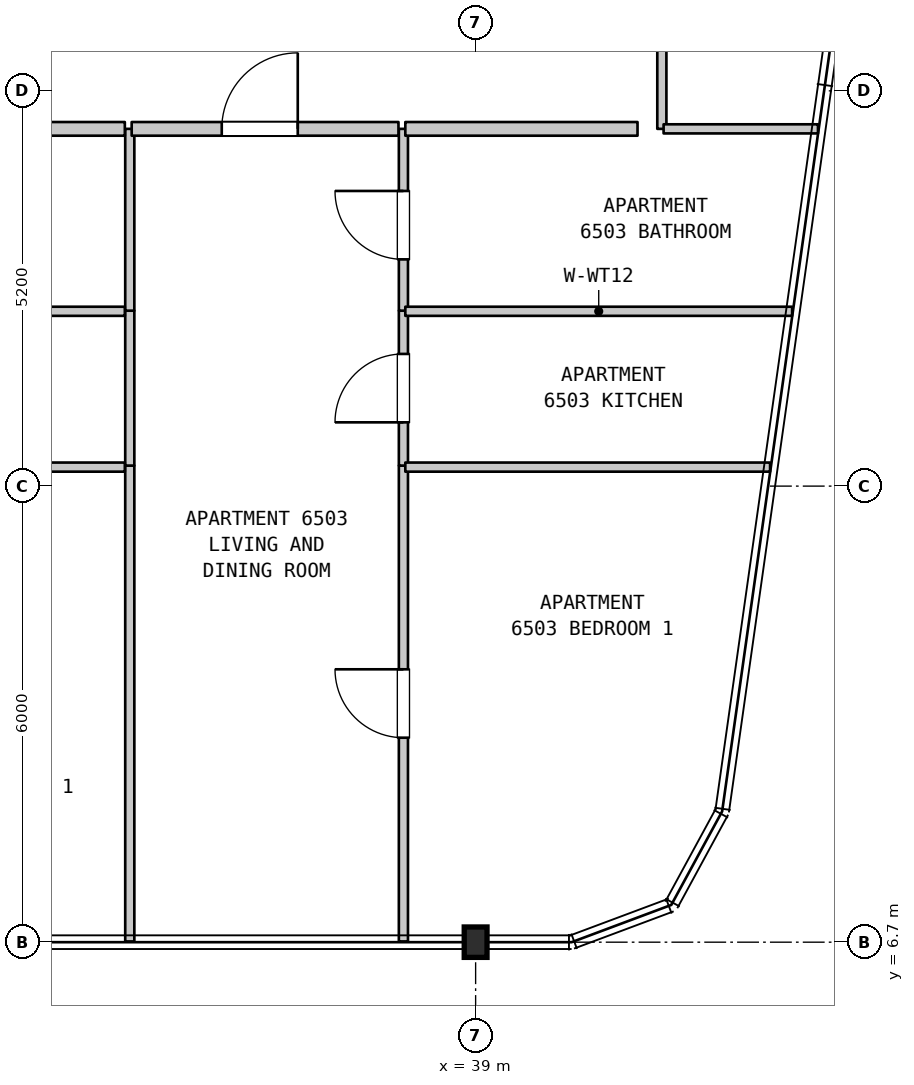
"""IFC4 building model, lengths in metres.
Left out: names, types, materials, properties, quantities, classifications, styles, units other than length and angle.
Written with IfcOpenShell. Run it as: python <this file> out.ifc"""

import sys

from ifc_helpers import new_model, si_unit, direction, frame, frame_2d, origin, origin_2d, place, context, subcontext, project, spatial, rectangle, i_section, extrude, element, fill, save


model = new_model("IFC4")
c1 = context("Model", 3, precision=1e-05, world=origin(), true_north=direction((0.0, 1.0)))
c2 = subcontext(c1, "Body", "Model", "MODEL_VIEW")
j1 = project(units=[si_unit("LENGTHUNIT", "METRE"), si_unit("PLANEANGLEUNIT", "RADIAN")], contexts=[c1])
p1 = place(None, origin())
s1 = spatial("IfcSite", under=j1, at=p1, CompositionType="ELEMENT")
p2 = place(p1, origin())
s2 = spatial("IfcBuilding", under=s1, at=p2, CompositionType="ELEMENT")
p3 = place(p2, frame((0.0, 0.0, 262.1)))
s3 = spatial("IfcBuildingStorey", under=s2, at=p3, CompositionType="ELEMENT", Elevation=262.1)
p4 = place(p3, frame((39.0, 6.7, 0.0), z_axis=(0.0, 0.0, 1.0), x_axis=(1.0, 0.0, 0.0)))
e1 = element("IfcColumn", 1, at=p4, inside=s3, PredefinedType="COLUMN", context=c2, shape_type="SweptSolid", body=[
    extrude(i_section(OverallWidth=0.3, OverallDepth=0.4, WebThickness=0.013, FlangeThickness=0.024, FilletRadius=0.027, at=origin_2d()), origin(), (0.0, 0.0, 1.0), 3.7),
])
p5 = place(p3, frame((34.45, 6.71, 0.0), z_axis=(0.0, 0.0, 1.0), x_axis=(0.0, 1.0, 0.0)))
e2 = element("IfcWall", 2, at=p5, inside=s3, PredefinedType="PARTITIONING", context=c2, shape_type="SweptSolid", body=[
    extrude(rectangle(XDim=6.26, YDim=0.12, at=frame_2d((3.13, 0.0))), origin(), (0.0, 0.0, 1.0), 3.39),
])
p6 = place(p3, frame((34.45, 12.97, 0.0), z_axis=(0.0, 0.0, 1.0), x_axis=(0.0, 1.0, 0.0)))
e3 = element("IfcWall", 3, at=p6, inside=s3, PredefinedType="PARTITIONING", context=c2, shape_type="SweptSolid", body=[
    extrude(rectangle(XDim=2.038, YDim=0.12, at=frame_2d((1.019, 0.0))), origin(), (0.0, 0.0, 1.0), 3.39),
])
p7 = place(p3, frame((34.45, 15.008, 0.0), z_axis=(0.0, 0.0, 1.0), x_axis=(0.0, 1.0, 0.0)))
e4 = element("IfcWall", 4, at=p7, inside=s3, PredefinedType="PARTITIONING", context=c2, shape_type="SweptSolid", body=[
    extrude(rectangle(XDim=2.392, YDim=0.12, at=frame_2d((1.196, 0.0))), origin(), (0.0, 0.0, 1.0), 3.39),
])
p8 = place(p3, frame((38.05, 6.71, 0.0), z_axis=(0.0, 0.0, 1.0), x_axis=(0.0, 1.0, 0.0)))
e5 = element("IfcWall", 5, at=p8, inside=s3, PredefinedType="PARTITIONING", context=c2, shape_type="SweptSolid", body=[
    extrude(rectangle(XDim=6.26, YDim=0.12, at=frame_2d((3.13, 0.0))), origin(), (0.0, 0.0, 1.0), 3.39),
])
p9 = place(p8, frame((2.68, 0.0, 0.0)))
e6 = element("IfcOpeningElement", 6, at=p9, cuts=e5, PredefinedType="OPENING", context=c2, shape_type="SweptSolid", body=[
    extrude(rectangle(XDim=0.9, YDim=2.15, at=frame_2d((0.45, 1.075))), frame((0.0, 0.07, 0.0), z_axis=(0.0, -1.0, 0.0), x_axis=(1.0, 0.0, 0.0)), (0.0, 0.0, 1.0), 0.14),
])
p10 = place(p3, frame((38.05, 12.97, 0.0), z_axis=(0.0, 0.0, 1.0), x_axis=(0.0, 1.0, 0.0)))
e7 = element("IfcWall", 7, at=p10, inside=s3, PredefinedType="PARTITIONING", context=c2, shape_type="SweptSolid", body=[
    extrude(rectangle(XDim=2.038, YDim=0.12, at=frame_2d((1.019, 0.0))), origin(), (0.0, 0.0, 1.0), 3.39),
])
p11 = place(p10, frame((0.569, 0.0, 0.0)))
e8 = element("IfcOpeningElement", 8, at=p11, cuts=e7, PredefinedType="OPENING", context=c2, shape_type="SweptSolid", body=[
    extrude(rectangle(XDim=0.9, YDim=2.15, at=frame_2d((0.45, 1.075))), frame((0.0, 0.07, 0.0), z_axis=(0.0, -1.0, 0.0), x_axis=(1.0, 0.0, 0.0)), (0.0, 0.0, 1.0), 0.14),
])
p12 = place(p3, frame((38.05, 15.008, 0.0), z_axis=(0.0, 0.0, 1.0), x_axis=(0.0, 1.0, 0.0)))
e9 = element("IfcWall", 9, at=p12, inside=s3, PredefinedType="PARTITIONING", context=c2, shape_type="SweptSolid", body=[
    extrude(rectangle(XDim=2.392, YDim=0.12, at=frame_2d((1.196, 0.0))), origin(), (0.0, 0.0, 1.0), 3.39),
])
p13 = place(p12, frame((0.675, 0.0, 0.0)))
e10 = element("IfcOpeningElement", 10, at=p13, cuts=e9, PredefinedType="OPENING", context=c2, shape_type="SweptSolid", body=[
    extrude(rectangle(XDim=0.9, YDim=2.1, at=frame_2d((0.45, 1.05))), frame((0.0, 0.07, 0.0), z_axis=(0.0, -1.0, 0.0), x_axis=(1.0, 0.0, 0.0)), (0.0, 0.0, 1.0), 0.14),
])
p14 = place(p3, frame((41.45, 17.4, 0.0), z_axis=(0.0, 0.0, 1.0), x_axis=(0.0, 1.0, 0.0)))
e11 = element("IfcWall", 11, at=p14, inside=s3, PredefinedType="PARTITIONING", context=c2, shape_type="SweptSolid", body=[
    extrude(rectangle(XDim=2.099, YDim=0.12, at=frame_2d((1.05, 0.0))), origin(), (0.0, 0.0, 1.0), 3.39),
])
p15 = place(p3, frame((29.845, 12.95, 0.0), z_axis=(0.0, 0.0, 1.0), x_axis=(1.0, 0.0, 0.0)))
e12 = element("IfcWall", 12, at=p15, inside=s3, PredefinedType="PARTITIONING", context=c2, shape_type="SweptSolid", body=[
    extrude(rectangle(XDim=4.54, YDim=0.12, at=frame_2d((2.27, 0.0))), origin(), (0.0, 0.0, 1.0), 3.39),
])
p16 = place(p3, frame((38.075, 12.95, 0.0), z_axis=(0.0, 0.0, 1.0), x_axis=(1.0, 0.0, 0.0)))
e13 = element("IfcWall", 13, at=p16, inside=s3, PredefinedType="PARTITIONING", context=c2, shape_type="SweptSolid", body=[
    extrude(rectangle(XDim=4.799, YDim=0.12, at=frame_2d((2.399, 0.0))), origin(), (0.0, 0.0, 1.0), 3.39),
])
p17 = place(p3, frame((29.845, 15.0, 0.0), z_axis=(0.0, 0.0, 1.0), x_axis=(1.0, 0.0, 0.0)))
e14 = element("IfcWall", 14, at=p17, inside=s3, PredefinedType="PARTITIONING", context=c2, shape_type="SweptSolid", body=[
    extrude(rectangle(XDim=4.54, YDim=0.12, at=frame_2d((2.27, 0.0))), origin(), (0.0, 0.0, 1.0), 3.39),
])
p18 = place(p3, frame((38.075, 15.0, 0.0), z_axis=(0.0, 0.0, 1.0), x_axis=(1.0, 0.0, 0.0)))
e15 = element("IfcWall", 15, at=p18, inside=s3, PredefinedType="PARTITIONING", context=c2, shape_type="SweptSolid", body=[
    extrude(rectangle(XDim=5.089, YDim=0.12, at=frame_2d((2.544, 0.0))), origin(), (0.0, 0.0, 1.0), 3.39),
])
p19 = place(p3, frame((29.845, 17.4, 0.0), z_axis=(0.0, 0.0, 1.0), x_axis=(1.0, 0.0, 0.0)))
e16 = element("IfcWall", 16, at=p19, inside=s3, PredefinedType="STANDARD", context=c2, shape_type="SweptSolid", body=[
    extrude(rectangle(XDim=4.54, YDim=0.18, at=frame_2d((2.27, 0.0))), origin(), (0.0, 0.0, 1.0), 3.39),
])
p20 = place(p3, frame((34.475, 17.4, 0.0), z_axis=(0.0, 0.0, 1.0), x_axis=(1.0, 0.0, 0.0)))
e17 = element("IfcWall", 17, at=p20, inside=s3, PredefinedType="STANDARD", context=c2, shape_type="SweptSolid", body=[
    extrude(rectangle(XDim=3.51, YDim=0.18, at=frame_2d((1.755, 0.0))), origin(), (0.0, 0.0, 1.0), 3.39),
])
p21 = place(p20, frame((1.185, 0.0, 0.0)))
e18 = element("IfcOpeningElement", 18, at=p21, cuts=e17, PredefinedType="OPENING", context=c2, shape_type="SweptSolid", body=[
    extrude(rectangle(XDim=1.0, YDim=2.15, at=frame_2d((0.5, 1.075))), frame((0.0, 0.1, 0.0), z_axis=(0.0, -1.0, 0.0), x_axis=(1.0, 0.0, 0.0)), (0.0, 0.0, 1.0), 0.2),
])
p22 = place(p3, frame((38.075, 17.4, 0.0), z_axis=(0.0, 0.0, 1.0), x_axis=(1.0, 0.0, 0.0)))
e19 = element("IfcWall", 19, at=p22, inside=s3, PredefinedType="STANDARD", context=c2, shape_type="SweptSolid", body=[
    extrude(rectangle(XDim=3.055, YDim=0.18, at=frame_2d((1.527, 0.0))), origin(), (0.0, 0.0, 1.0), 3.39),
])
p23 = place(p3, frame((41.473, 17.4, 0.0), z_axis=(0.0, 0.0, 1.0), x_axis=(1.0, 0.0, 0.0)))
e20 = element("IfcWall", 20, at=p23, inside=s3, PredefinedType="PARTITIONING", context=c2, shape_type="SweptSolid", body=[
    extrude(rectangle(XDim=2.031, YDim=0.12, at=frame_2d((1.016, 0.0))), origin(), (0.0, 0.0, 1.0), 3.39),
])
p24 = place(p9, origin())
e21 = element("IfcDoor", 21, at=p24, inside=s3, OperationType="SINGLE_SWING_RIGHT", PredefinedType="DOOR", context=c2, shape_type="SweptSolid", body=[
    extrude(rectangle(XDim=0.9, YDim=2.15, at=frame_2d((0.45, 1.075))), frame((0.0, 0.025, 0.0), z_axis=(0.0, -1.0, 0.0), x_axis=(1.0, 0.0, 0.0)), (0.0, 0.0, 1.0), 0.05),
])
fill(e6, e21)
p25 = place(p11, origin())
e22 = element("IfcDoor", 22, at=p25, inside=s3, OperationType="SINGLE_SWING_LEFT", PredefinedType="DOOR", context=c2, shape_type="SweptSolid", body=[
    extrude(rectangle(XDim=0.9, YDim=2.15, at=frame_2d((0.45, 1.075))), frame((0.0, 0.025, 0.0), z_axis=(0.0, -1.0, 0.0), x_axis=(1.0, 0.0, 0.0)), (0.0, 0.0, 1.0), 0.05),
])
fill(e8, e22)
p26 = place(p13, origin())
e23 = element("IfcDoor", 23, at=p26, inside=s3, OperationType="SINGLE_SWING_RIGHT", PredefinedType="DOOR", context=c2, shape_type="SweptSolid", body=[
    extrude(rectangle(XDim=0.9, YDim=2.1, at=frame_2d((0.45, 1.05))), frame((0.0, 0.025, 0.0), z_axis=(0.0, -1.0, 0.0), x_axis=(1.0, 0.0, 0.0)), (0.0, 0.0, 1.0), 0.05),
])
fill(e10, e23)
p27 = place(p21, origin())
e24 = element("IfcDoor", 24, at=p27, inside=s3, OperationType="SINGLE_SWING_RIGHT", PredefinedType="DOOR", context=c2, shape_type="SweptSolid", body=[
    extrude(rectangle(XDim=1.0, YDim=2.15, at=frame_2d((0.5, 1.075))), frame((0.0, 0.025, 0.0), z_axis=(0.0, -1.0, 0.0), x_axis=(1.0, 0.0, 0.0)), (0.0, 0.0, 1.0), 0.05),
])
fill(e18, e24)
save(model, sys.argv[1])
